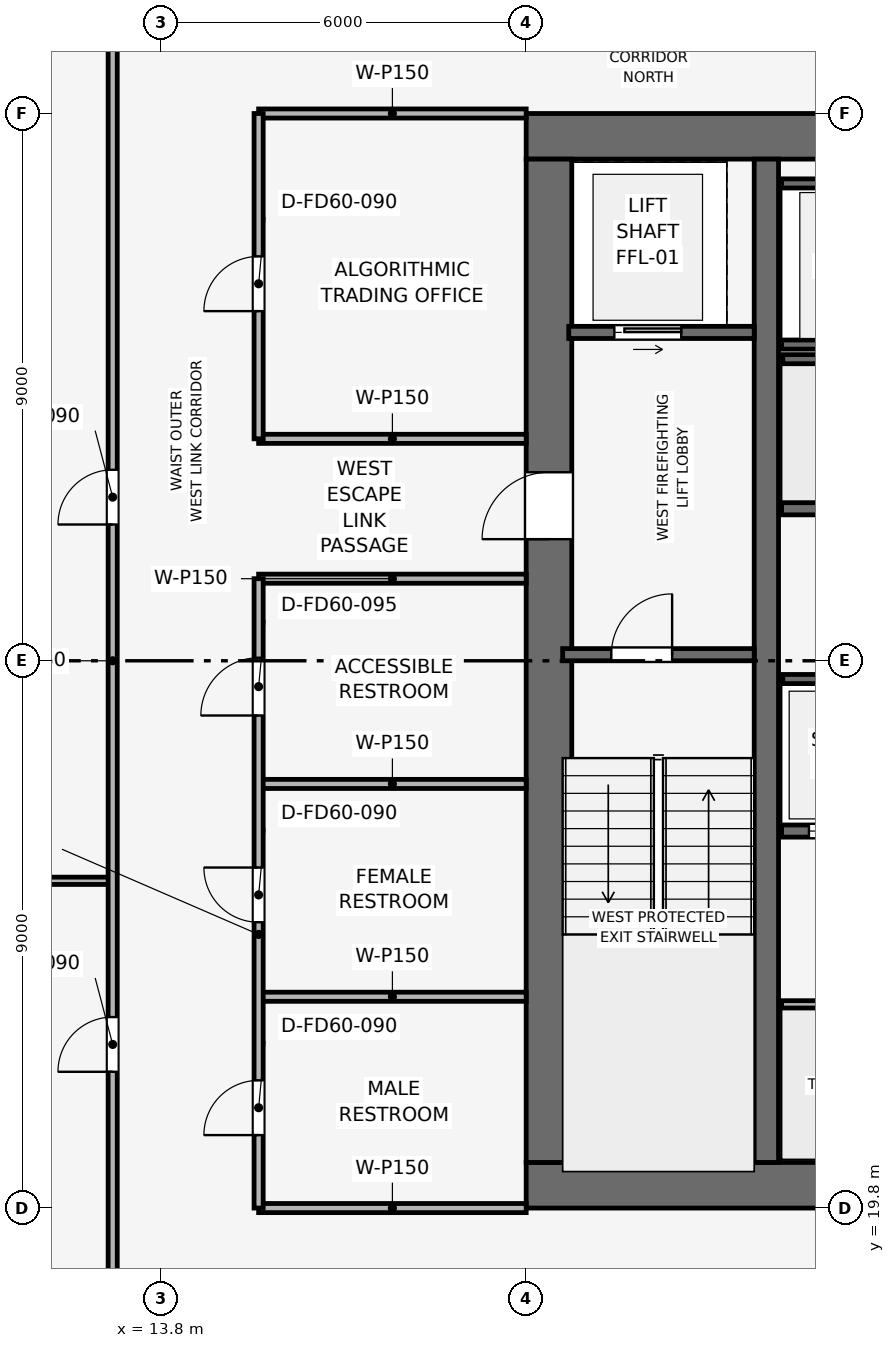
"""IFC4 building model, lengths in metres.
Left out: names, types, materials, properties, quantities, classifications, styles, units other than length and angle.
Written with IfcOpenShell. Run it as: python <this file> out.ifc"""

import sys

from ifc_helpers import new_model, si_unit, direction, frame, frame_2d, origin, place, context, subcontext, project, spatial, rectangle, extrude, element, fill, save


model = new_model("IFC4")
c1 = context("Model", 3, precision=1e-05, world=origin(), true_north=direction((0.0, 1.0)))
c2 = subcontext(c1, "Body", "Model", "MODEL_VIEW")
j1 = project(units=[si_unit("LENGTHUNIT", "METRE"), si_unit("PLANEANGLEUNIT", "RADIAN")], contexts=[c1])
p1 = place(None, origin())
s1 = spatial("IfcSite", under=j1, at=p1, CompositionType="ELEMENT")
p2 = place(p1, origin())
s2 = spatial("IfcBuilding", under=s1, at=p2, CompositionType="ELEMENT")
p3 = place(p2, frame((0.0, 0.0, 203.7)))
s3 = spatial("IfcBuildingStorey", under=s2, at=p3, CompositionType="ELEMENT", Elevation=203.7)
p4 = place(p3, frame((19.8, 20.175, 0.0), z_axis=(0.0, 0.0, 1.0), x_axis=(1.0, 0.0, 0.0)))
e1 = element("IfcWall", 1, at=p4, inside=s3, PredefinedType="SHEAR", context=c2, shape_type="SweptSolid", body=[
    extrude(rectangle(XDim=18.0, YDim=0.75, at=frame_2d((9.0, 0.0))), origin(), (0.0, 0.0, 1.0), 3.75),
])
p5 = place(p4, frame((8.4, 0.0, 0.0)))
e2 = element("IfcOpeningElement", 2, at=p5, cuts=e1, PredefinedType="OPENING", context=c2, shape_type="SweptSolid", body=[
    extrude(rectangle(XDim=1.2, YDim=2.2, at=frame_2d((0.6, 1.1))), frame((0.0, 0.385, 0.0), z_axis=(0.0, -1.0, 0.0), x_axis=(1.0, 0.0, 0.0)), (0.0, 0.0, 1.0), 0.77),
])
p6 = place(p3, frame((19.8, 37.425, 0.0), z_axis=(0.0, 0.0, 1.0), x_axis=(1.0, 0.0, 0.0)))
e3 = element("IfcWall", 3, at=p6, inside=s3, PredefinedType="SHEAR", context=c2, shape_type="SweptSolid", body=[
    extrude(rectangle(XDim=18.0, YDim=0.75, at=frame_2d((9.0, 0.0))), origin(), (0.0, 0.0, 1.0), 3.75),
])
p7 = place(p6, frame((7.05, 0.0, 0.0)))
e4 = element("IfcOpeningElement", 4, at=p7, cuts=e3, PredefinedType="OPENING", context=c2, shape_type="SweptSolid", body=[
    extrude(rectangle(XDim=1.1, YDim=2.15, at=frame_2d((0.55, 1.075))), frame((0.0, 0.385, 0.0), z_axis=(0.0, -1.0, 0.0), x_axis=(1.0, 0.0, 0.0)), (0.0, 0.0, 1.0), 0.77),
])
p8 = place(p3, frame((20.175, 20.55, 0.0), z_axis=(0.0, 0.0, 1.0), x_axis=(0.0, 1.0, 0.0)))
e5 = element("IfcWall", 5, at=p8, inside=s3, PredefinedType="SHEAR", context=c2, shape_type="SweptSolid", body=[
    extrude(rectangle(XDim=16.5, YDim=0.75, at=frame_2d((8.25, 0.0))), origin(), (0.0, 0.0, 1.0), 3.75),
])
p9 = place(p8, frame((10.25, 0.0, 0.0)))
e6 = element("IfcOpeningElement", 6, at=p9, cuts=e5, PredefinedType="OPENING", context=c2, shape_type="SweptSolid", body=[
    extrude(rectangle(XDim=1.1, YDim=2.15, at=frame_2d((0.55, 1.075))), frame((0.0, 0.385, 0.0), z_axis=(0.0, -1.0, 0.0), x_axis=(1.0, 0.0, 0.0)), (0.0, 0.0, 1.0), 0.77),
])
p10 = place(p3, frame((23.75, 20.55, 0.0), z_axis=(0.0, 0.0, 1.0), x_axis=(0.0, 1.0, 0.0)))
e7 = element("IfcWall", 7, at=p10, inside=s3, PredefinedType="SHEAR", context=c2, shape_type="SweptSolid", body=[
    extrude(rectangle(XDim=16.5, YDim=0.4, at=frame_2d((8.25, 0.0))), origin(), (0.0, 0.0, 1.0), 3.75),
])
p11 = place(p3, frame((20.4, 28.9, 0.0), z_axis=(0.0, 0.0, 1.0), x_axis=(1.0, 0.0, 0.0)))
e8 = element("IfcWall", 8, at=p11, inside=s3, PredefinedType="SHEAR", context=c2, shape_type="SweptSolid", body=[
    extrude(rectangle(XDim=3.15, YDim=0.2, at=frame_2d((1.575, 0.0))), origin(), (0.0, 0.0, 1.0), 3.5),
])
p12 = place(p11, frame((0.8, 0.0, 0.0)))
e9 = element("IfcOpeningElement", 9, at=p12, cuts=e8, PredefinedType="OPENING", context=c2, shape_type="SweptSolid", body=[
    extrude(rectangle(XDim=1.0, YDim=2.1, at=frame_2d((0.5, 1.05))), frame((0.0, 0.11, 0.0), z_axis=(0.0, -1.0, 0.0), x_axis=(1.0, 0.0, 0.0)), (0.0, 0.0, 1.0), 0.22),
])
p13 = place(p3, frame((20.5, 34.2, 0.0), z_axis=(0.0, 0.0, 1.0), x_axis=(1.0, 0.0, 0.0)))
e10 = element("IfcWall", 10, at=p13, inside=s3, PredefinedType="SHEAR", context=c2, shape_type="SweptSolid", body=[
    extrude(rectangle(XDim=3.05, YDim=0.2, at=frame_2d((1.525, 0.0))), origin(), (0.0, 0.0, 1.0), 3.5),
])
p14 = place(p13, frame((0.75, 0.0, 0.0)))
e11 = element("IfcOpeningElement", 11, at=p14, cuts=e10, PredefinedType="OPENING", context=c2, shape_type="SweptSolid", body=[
    extrude(rectangle(XDim=1.1, YDim=2.15, at=frame_2d((0.55, 1.075))), frame((0.0, 0.11, 0.0), z_axis=(0.0, -1.0, 0.0), x_axis=(1.0, 0.0, 0.0)), (0.0, 0.0, 1.0), 0.22),
])
for number, where, z_axis, x_axis in (
    (12, (24.0, 34.0, 0.0), (0.0, 0.0, 1.0), (1.0, 0.0, 0.0)),
    (13, (24.0, 36.65, 0.0), (0.0, 0.0, 1.0), (1.0, 0.0, 0.0)),
):
    element("IfcWall", number, at=place(p3, frame(where, z_axis=z_axis, x_axis=x_axis)), inside=s3, PredefinedType="SHEAR", context=c2, shape_type="SweptSolid", body=[
        extrude(rectangle(XDim=2.48, YDim=0.15, at=frame_2d((1.24, 0.0))), origin(), (0.0, 0.0, 1.0), 3.5),
    ])
p15 = place(p3, frame((24.0, 26.0, 0.0), z_axis=(0.0, 0.0, 1.0), x_axis=(1.0, 0.0, 0.0)))
e14 = element("IfcWall", 14, at=p15, inside=s3, PredefinedType="SHEAR", context=c2, shape_type="SweptSolid", body=[
    extrude(rectangle(XDim=2.0, YDim=0.2, at=frame_2d((1.0, 0.0))), origin(), (0.0, 0.0, 1.0), 3.5),
])
p16 = place(p15, frame((0.45, 0.0, 0.0)))
e15 = element("IfcOpeningElement", 15, at=p16, cuts=e14, PredefinedType="OPENING", context=c2, shape_type="SweptSolid", body=[
    extrude(rectangle(XDim=1.1, YDim=2.15, at=frame_2d((0.55, 1.075))), frame((0.0, 0.11, 0.0), z_axis=(0.0, -1.0, 0.0), x_axis=(1.0, 0.0, 0.0)), (0.0, 0.0, 1.0), 0.22),
])
p17 = place(p3, frame((24.0, 31.3, 0.0), z_axis=(0.0, 0.0, 1.0), x_axis=(1.0, 0.0, 0.0)))
e16 = element("IfcWall", 16, at=p17, inside=s3, PredefinedType="SHEAR", context=c2, shape_type="SweptSolid", body=[
    extrude(rectangle(XDim=2.0, YDim=0.2, at=frame_2d((1.0, 0.0))), origin(), (0.0, 0.0, 1.0), 3.5),
])
for number, where, z_axis, x_axis in (
    (17, (24.02, 28.5, 0.0), (0.0, 0.0, 1.0), (1.0, 0.0, 0.0)),
    (18, (24.02, 33.76, 0.0), (0.0, 0.0, 1.0), (1.0, 0.0, 0.0)),
):
    element("IfcWall", number, at=place(p3, frame(where, z_axis=z_axis, x_axis=x_axis)), inside=s3, PredefinedType="SHEAR", context=c2, shape_type="SweptSolid", body=[
        extrude(rectangle(XDim=4.08, YDim=0.15, at=frame_2d((2.04, 0.0))), origin(), (0.0, 0.0, 1.0), 3.5),
    ])
p18 = place(p3, frame((24.0, 23.15, 0.0), z_axis=(0.0, 0.0, 1.0), x_axis=(1.0, 0.0, 0.0)))
e19 = element("IfcWall", 19, at=p18, inside=s3, PredefinedType="PARTITIONING", context=c2, shape_type="SweptSolid", body=[
    extrude(rectangle(XDim=4.05, YDim=0.12, at=frame_2d((2.025, 0.0))), origin(), (0.0, 0.0, 1.0), 3.5),
])
p19 = place(p18, frame((1.575, 0.0, 0.0)))
e20 = element("IfcOpeningElement", 20, at=p19, cuts=e19, PredefinedType="OPENING", context=c2, shape_type="SweptSolid", body=[
    extrude(rectangle(XDim=0.9, YDim=2.1, at=frame_2d((0.45, 1.05))), frame((0.0, 0.07, 0.0), z_axis=(0.0, -1.0, 0.0), x_axis=(1.0, 0.0, 0.0)), (0.0, 0.0, 1.0), 0.14),
])
p20 = place(p3, frame((15.4, 19.8, 0.0), z_axis=(0.0, 0.0, 1.0), x_axis=(1.0, 0.0, 0.0)))
e21 = element("IfcWall", 21, at=p20, inside=s3, PredefinedType="PARTITIONING", context=c2, shape_type="SweptSolid", body=[
    extrude(rectangle(XDim=4.4, YDim=0.15, at=frame_2d((2.2, 0.0))), origin(), (0.0, 0.0, 1.0), 3.035),
])
for number, where, z_axis, x_axis in (
    (22, (15.4, 23.275, 0.0), (0.0, 0.0, 1.0), (1.0, 0.0, 0.0)),
    (23, (15.4, 26.775, 0.0), (0.0, 0.0, 1.0), (1.0, 0.0, 0.0)),
    (24, (15.4, 30.15, 0.0), (0.0, 0.0, 1.0), (1.0, 0.0, 0.0)),
    (25, (15.4, 32.45, 0.0), (0.0, 0.0, 1.0), (1.0, 0.0, 0.0)),
):
    element("IfcWall", number, at=place(p3, frame(where, z_axis=z_axis, x_axis=x_axis)), inside=s3, PredefinedType="PARTITIONING", context=c2, shape_type="SweptSolid", body=[
        extrude(rectangle(XDim=4.4, YDim=0.15, at=frame_2d((2.2, 0.0))), origin(), (0.0, 0.0, 1.0), 3.5),
    ])
p21 = place(p3, frame((15.4, 37.8, 0.0), z_axis=(0.0, 0.0, 1.0), x_axis=(1.0, 0.0, 0.0)))
e26 = element("IfcWall", 26, at=p21, inside=s3, PredefinedType="PARTITIONING", context=c2, shape_type="SweptSolid", body=[
    extrude(rectangle(XDim=4.4, YDim=0.15, at=frame_2d((2.2, 0.0))), origin(), (0.0, 0.0, 1.0), 3.035),
])
p22 = place(p3, frame((15.4, 19.8, 0.0), z_axis=(0.0, 0.0, 1.0), x_axis=(0.0, 1.0, 0.0)))
e27 = element("IfcWall", 27, at=p22, inside=s3, PredefinedType="PARTITIONING", context=c2, shape_type="SweptSolid", body=[
    extrude(rectangle(XDim=10.35, YDim=0.15, at=frame_2d((5.175, 0.0))), origin(), (0.0, 0.0, 1.0), 3.035),
])
p23 = place(p22, frame((1.2, 0.0, 0.0)))
e28 = element("IfcOpeningElement", 28, at=p23, cuts=e27, PredefinedType="OPENING", context=c2, shape_type="SweptSolid", body=[
    extrude(rectangle(XDim=0.9, YDim=2.1, at=frame_2d((0.45, 1.05))), frame((0.0, 0.085, 0.0), z_axis=(0.0, -1.0, 0.0), x_axis=(1.0, 0.0, 0.0)), (0.0, 0.0, 1.0), 0.17),
])
p24 = place(p22, frame((4.7, 0.0, 0.0)))
e29 = element("IfcOpeningElement", 29, at=p24, cuts=e27, PredefinedType="OPENING", context=c2, shape_type="SweptSolid", body=[
    extrude(rectangle(XDim=0.9, YDim=2.1, at=frame_2d((0.45, 1.05))), frame((0.0, 0.085, 0.0), z_axis=(0.0, -1.0, 0.0), x_axis=(1.0, 0.0, 0.0)), (0.0, 0.0, 1.0), 0.17),
])
p25 = place(p22, frame((8.1, 0.0, 0.0)))
e30 = element("IfcOpeningElement", 30, at=p25, cuts=e27, PredefinedType="OPENING", context=c2, shape_type="SweptSolid", body=[
    extrude(rectangle(XDim=0.95, YDim=2.1, at=frame_2d((0.475, 1.05))), frame((0.0, 0.085, 0.0), z_axis=(0.0, -1.0, 0.0), x_axis=(1.0, 0.0, 0.0)), (0.0, 0.0, 1.0), 0.17),
])
p26 = place(p3, frame((15.4, 32.45, 0.0), z_axis=(0.0, 0.0, 1.0), x_axis=(0.0, 1.0, 0.0)))
e31 = element("IfcWall", 31, at=p26, inside=s3, PredefinedType="PARTITIONING", context=c2, shape_type="SweptSolid", body=[
    extrude(rectangle(XDim=5.35, YDim=0.15, at=frame_2d((2.675, 0.0))), origin(), (0.0, 0.0, 1.0), 3.035),
])
p27 = place(p26, frame((2.1, 0.0, 0.0)))
e32 = element("IfcOpeningElement", 32, at=p27, cuts=e31, PredefinedType="OPENING", context=c2, shape_type="SweptSolid", body=[
    extrude(rectangle(XDim=0.9, YDim=2.1, at=frame_2d((0.45, 1.05))), frame((0.0, 0.085, 0.0), z_axis=(0.0, -1.0, 0.0), x_axis=(1.0, 0.0, 0.0)), (0.0, 0.0, 1.0), 0.17),
])
p28 = place(p3, frame((1.93, 25.182, 0.0), z_axis=(0.0, 0.0, 1.0), x_axis=(1.0, 0.0, 0.0)))
e33 = element("IfcWall", 33, at=p28, inside=s3, PredefinedType="PARTITIONING", context=c2, shape_type="SweptSolid", body=[
    extrude(rectangle(XDim=11.07, YDim=0.12, at=frame_2d((5.535, 0.0))), origin(), (0.0, 0.0, 1.0), 2.885),
])
p29 = place(p3, frame((13.0, 17.4, 0.0), z_axis=(0.0, 0.0, 1.0), x_axis=(0.0, 1.0, 0.0)))
e34 = element("IfcWall", 34, at=p29, inside=s3, PredefinedType="PARTITIONING", context=c2, shape_type="SweptSolid", body=[
    extrude(rectangle(XDim=22.8, YDim=0.15, at=frame_2d((11.4, 0.0))), origin(), (0.0, 0.0, 1.0), 3.035),
])
p30 = place(p29, frame((4.641, 0.0, 0.0)))
e35 = element("IfcOpeningElement", 35, at=p30, cuts=e34, PredefinedType="OPENING", context=c2, shape_type="SweptSolid", body=[
    extrude(rectangle(XDim=0.9, YDim=2.1, at=frame_2d((0.45, 1.05))), frame((0.0, 0.085, 0.0), z_axis=(0.0, -1.0, 0.0), x_axis=(1.0, 0.0, 0.0)), (0.0, 0.0, 1.0), 0.17),
])
p31 = place(p29, frame((13.641, 0.0, 0.0)))
e36 = element("IfcOpeningElement", 36, at=p31, cuts=e34, PredefinedType="OPENING", context=c2, shape_type="SweptSolid", body=[
    extrude(rectangle(XDim=0.9, YDim=2.1, at=frame_2d((0.45, 1.05))), frame((0.0, 0.085, 0.0), z_axis=(0.0, -1.0, 0.0), x_axis=(1.0, 0.0, 0.0)), (0.0, 0.0, 1.0), 0.17),
])
p32 = place(p12, origin())
e37 = element("IfcDoor", 37, at=p32, inside=s3, OperationType="SINGLE_SWING_RIGHT", PredefinedType="DOOR", context=c2, shape_type="SweptSolid", body=[
    extrude(rectangle(XDim=1.0, YDim=2.1, at=frame_2d((0.5, 1.05))), frame((0.0, 0.025, 0.0), z_axis=(0.0, -1.0, 0.0), x_axis=(1.0, 0.0, 0.0)), (0.0, 0.0, 1.0), 0.05),
])
fill(e9, e37)
p33 = place(p14, origin())
e38 = element("IfcDoor", 38, at=p33, inside=s3, OperationType="SLIDING_TO_RIGHT", PredefinedType="DOOR", context=c2, shape_type="SweptSolid", body=[
    extrude(rectangle(XDim=1.1, YDim=2.15, at=frame_2d((0.55, 1.075))), frame((0.0, 0.025, 0.0), z_axis=(0.0, -1.0, 0.0), x_axis=(1.0, 0.0, 0.0)), (0.0, 0.0, 1.0), 0.05),
])
fill(e11, e38)
p34 = place(p16, origin())
e39 = element("IfcDoor", 39, at=p34, inside=s3, OperationType="SLIDING_TO_RIGHT", PredefinedType="DOOR", context=c2, shape_type="SweptSolid", body=[
    extrude(rectangle(XDim=1.1, YDim=2.15, at=frame_2d((0.55, 1.075))), frame((0.0, 0.025, 0.0), z_axis=(0.0, -1.0, 0.0), x_axis=(1.0, 0.0, 0.0)), (0.0, 0.0, 1.0), 0.05),
])
fill(e15, e39)
p35 = place(p23, origin())
e40 = element("IfcDoor", 40, at=p35, inside=s3, OperationType="SINGLE_SWING_LEFT", PredefinedType="DOOR", context=c2, shape_type="SweptSolid", body=[
    extrude(rectangle(XDim=0.9, YDim=2.1, at=frame_2d((0.45, 1.05))), frame((0.0, 0.025, 0.0), z_axis=(0.0, -1.0, 0.0), x_axis=(1.0, 0.0, 0.0)), (0.0, 0.0, 1.0), 0.05),
])
fill(e28, e40)
p36 = place(p24, origin())
e41 = element("IfcDoor", 41, at=p36, inside=s3, OperationType="SINGLE_SWING_RIGHT", PredefinedType="DOOR", context=c2, shape_type="SweptSolid", body=[
    extrude(rectangle(XDim=0.9, YDim=2.1, at=frame_2d((0.45, 1.05))), frame((0.0, 0.025, 0.0), z_axis=(0.0, -1.0, 0.0), x_axis=(1.0, 0.0, 0.0)), (0.0, 0.0, 1.0), 0.05),
])
fill(e29, e41)
p37 = place(p25, origin())
e42 = element("IfcDoor", 42, at=p37, inside=s3, OperationType="SINGLE_SWING_LEFT", PredefinedType="DOOR", context=c2, shape_type="SweptSolid", body=[
    extrude(rectangle(XDim=0.95, YDim=2.1, at=frame_2d((0.475, 1.05))), frame((0.0, 0.025, 0.0), z_axis=(0.0, -1.0, 0.0), x_axis=(1.0, 0.0, 0.0)), (0.0, 0.0, 1.0), 0.05),
])
fill(e30, e42)
p38 = place(p27, origin())
e43 = element("IfcDoor", 43, at=p38, inside=s3, OperationType="SINGLE_SWING_LEFT", PredefinedType="DOOR", context=c2, shape_type="SweptSolid", body=[
    extrude(rectangle(XDim=0.9, YDim=2.1, at=frame_2d((0.45, 1.05))), frame((0.0, 0.025, 0.0), z_axis=(0.0, -1.0, 0.0), x_axis=(1.0, 0.0, 0.0)), (0.0, 0.0, 1.0), 0.05),
])
fill(e32, e43)
p39 = place(p30, origin())
e44 = element("IfcDoor", 44, at=p39, inside=s3, OperationType="SINGLE_SWING_LEFT", PredefinedType="DOOR", context=c2, shape_type="SweptSolid", body=[
    extrude(rectangle(XDim=0.9, YDim=2.1, at=frame_2d((0.45, 1.05))), frame((0.0, 0.025, 0.0), z_axis=(0.0, -1.0, 0.0), x_axis=(1.0, 0.0, 0.0)), (0.0, 0.0, 1.0), 0.05),
])
fill(e35, e44)
p40 = place(p31, origin())
e45 = element("IfcDoor", 45, at=p40, inside=s3, OperationType="SINGLE_SWING_LEFT", PredefinedType="DOOR", context=c2, shape_type="SweptSolid", body=[
    extrude(rectangle(XDim=0.9, YDim=2.1, at=frame_2d((0.45, 1.05))), frame((0.0, 0.025, 0.0), z_axis=(0.0, -1.0, 0.0), x_axis=(1.0, 0.0, 0.0)), (0.0, 0.0, 1.0), 0.05),
])
fill(e36, e45)
p41 = place(p9, origin())
e46 = element("IfcDoor", 46, at=p41, inside=s3, OperationType="SINGLE_SWING_LEFT", PredefinedType="DOOR", context=c2, shape_type="SweptSolid", body=[
    extrude(rectangle(XDim=1.1, YDim=2.15, at=frame_2d((0.55, 1.075))), frame((0.0, 0.025, 0.0), z_axis=(0.0, -1.0, 0.0), x_axis=(1.0, 0.0, 0.0)), (0.0, 0.0, 1.0), 0.05),
])
fill(e6, e46)
save(model, sys.argv[1])
